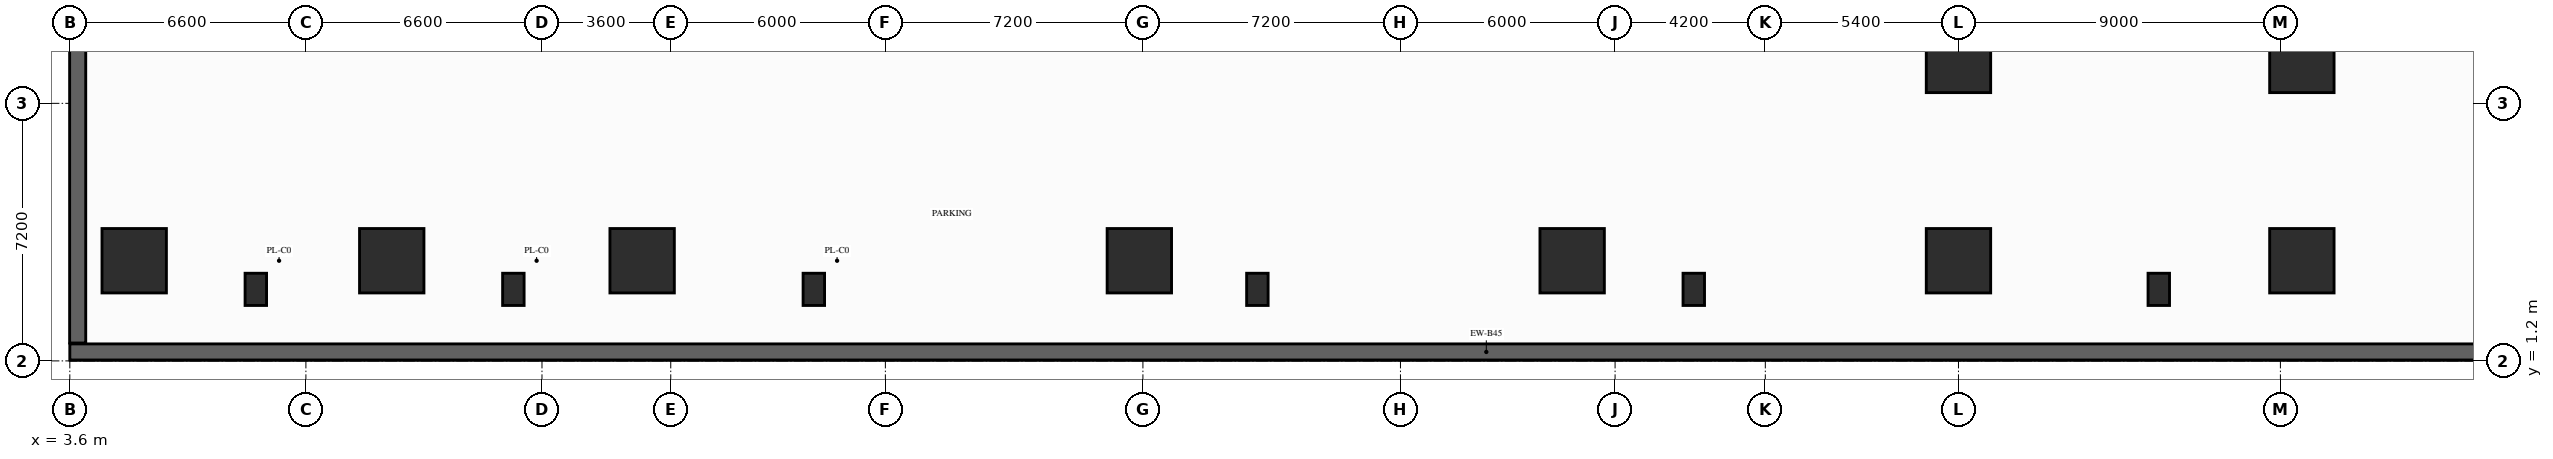
"""IFC4 building model, lengths in metres.
Left out: names, types, materials, properties, quantities, classifications, styles, units other than length and angle.
Written with IfcOpenShell. Run it as: python <this file> out.ifc"""

import sys

from ifc_helpers import new_model, si_unit, direction, frame, frame_2d, origin, origin_2d, place, context, subcontext, project, spatial, rectangle, extrude, element, save


model = new_model("IFC4")
c1 = context("Model", 3, precision=1e-05, world=origin(), true_north=direction((0.0, 1.0)))
c2 = subcontext(c1, "Body", "Model", "MODEL_VIEW")
j1 = project(units=[si_unit("LENGTHUNIT", "METRE"), si_unit("PLANEANGLEUNIT", "RADIAN")], contexts=[c1])
p1 = place(None, origin())
s1 = spatial("IfcSite", under=j1, at=p1, CompositionType="ELEMENT")
p2 = place(p1, origin())
s2 = spatial("IfcBuilding", under=s1, at=p2, CompositionType="ELEMENT")
p3 = place(p2, frame((0.0, 0.0, -3.8)))
s3 = spatial("IfcBuildingStorey", under=s2, at=p3, CompositionType="ELEMENT", Elevation=-3.8)
for number, where, z_axis, x_axis in (
    (1, (56.4, 9.6, 0.0), (0.0, 0.0, 1.0), (1.0, 0.0, 0.0)),
    (2, (66.0, 9.6, 0.0), (0.0, 0.0, 1.0), (1.0, 0.0, 0.0)),
    (3, (5.4, 4.0, 0.0), (0.0, 0.0, 1.0), (1.0, 0.0, 0.0)),
    (4, (12.6, 4.0, 0.0), (0.0, 0.0, 1.0), (1.0, 0.0, 0.0)),
    (5, (19.6, 4.0, 0.0), (0.0, 0.0, 1.0), (1.0, 0.0, 0.0)),
    (6, (33.5, 4.0, 0.0), (0.0, 0.0, 1.0), (1.0, 0.0, 0.0)),
    (7, (45.6, 4.0, 0.0), (0.0, 0.0, 1.0), (1.0, 0.0, 0.0)),
    (8, (56.4, 4.0, 0.0), (0.0, 0.0, 1.0), (1.0, 0.0, 0.0)),
    (9, (66.0, 4.0, 0.0), (0.0, 0.0, 1.0), (1.0, 0.0, 0.0)),
):
    element("IfcColumn", number, at=place(p3, frame(where, z_axis=z_axis, x_axis=x_axis)), inside=s3, PredefinedType="COLUMN", context=c2, shape_type="SweptSolid", body=[
        extrude(rectangle(XDim=1.8, YDim=1.8, at=origin_2d()), origin(), (0.0, 0.0, 1.0), 3.8),
    ])
for number, where, z_axis, x_axis in (
    (10, (8.8, 3.2, 0.0), (0.0, 0.0, 1.0), (1.0, 0.0, 0.0)),
    (11, (16.0, 3.2, 0.0), (0.0, 0.0, 1.0), (1.0, 0.0, 0.0)),
    (12, (24.4, 3.2, 0.0), (0.0, 0.0, 1.0), (1.0, 0.0, 0.0)),
    (13, (36.8, 3.2, 0.0), (0.0, 0.0, 1.0), (1.0, 0.0, 0.0)),
    (14, (49.0, 3.2, 0.0), (0.0, 0.0, 1.0), (1.0, 0.0, 0.0)),
    (15, (62.0, 3.2, 0.0), (0.0, 0.0, 1.0), (1.0, 0.0, 0.0)),
):
    element("IfcColumn", number, at=place(p3, frame(where, z_axis=z_axis, x_axis=x_axis)), inside=s3, PredefinedType="PILASTER", context=c2, shape_type="SweptSolid", body=[
        extrude(rectangle(XDim=0.6, YDim=0.9, at=origin_2d()), origin(), (0.0, 0.0, 1.0), 3.8),
    ])
p4 = place(p3, frame((3.6, 1.45, 0.0), z_axis=(0.0, 0.0, 1.0), x_axis=(1.0, 0.0, 0.0)))
e16 = element("IfcWall", 16, at=p4, inside=s3, PredefinedType="SOLIDWALL", context=c2, shape_type="SweptSolid", body=[
    extrude(rectangle(XDim=79.2, YDim=0.45, at=frame_2d((39.6, 0.0))), origin(), (0.0, 0.0, 1.0), 3.55),
])
p5 = place(p3, frame((3.82, 49.9, 0.0), z_axis=(0.0, 0.0, 1.0), x_axis=(0.0, -1.0, 0.0)))
e17 = element("IfcWall", 17, at=p5, inside=s3, PredefinedType="SOLIDWALL", context=c2, shape_type="SweptSolid", body=[
    extrude(rectangle(XDim=48.2, YDim=0.45, at=frame_2d((24.1, 0.0))), origin(), (0.0, 0.0, 1.0), 3.55),
])
save(model, sys.argv[1])
